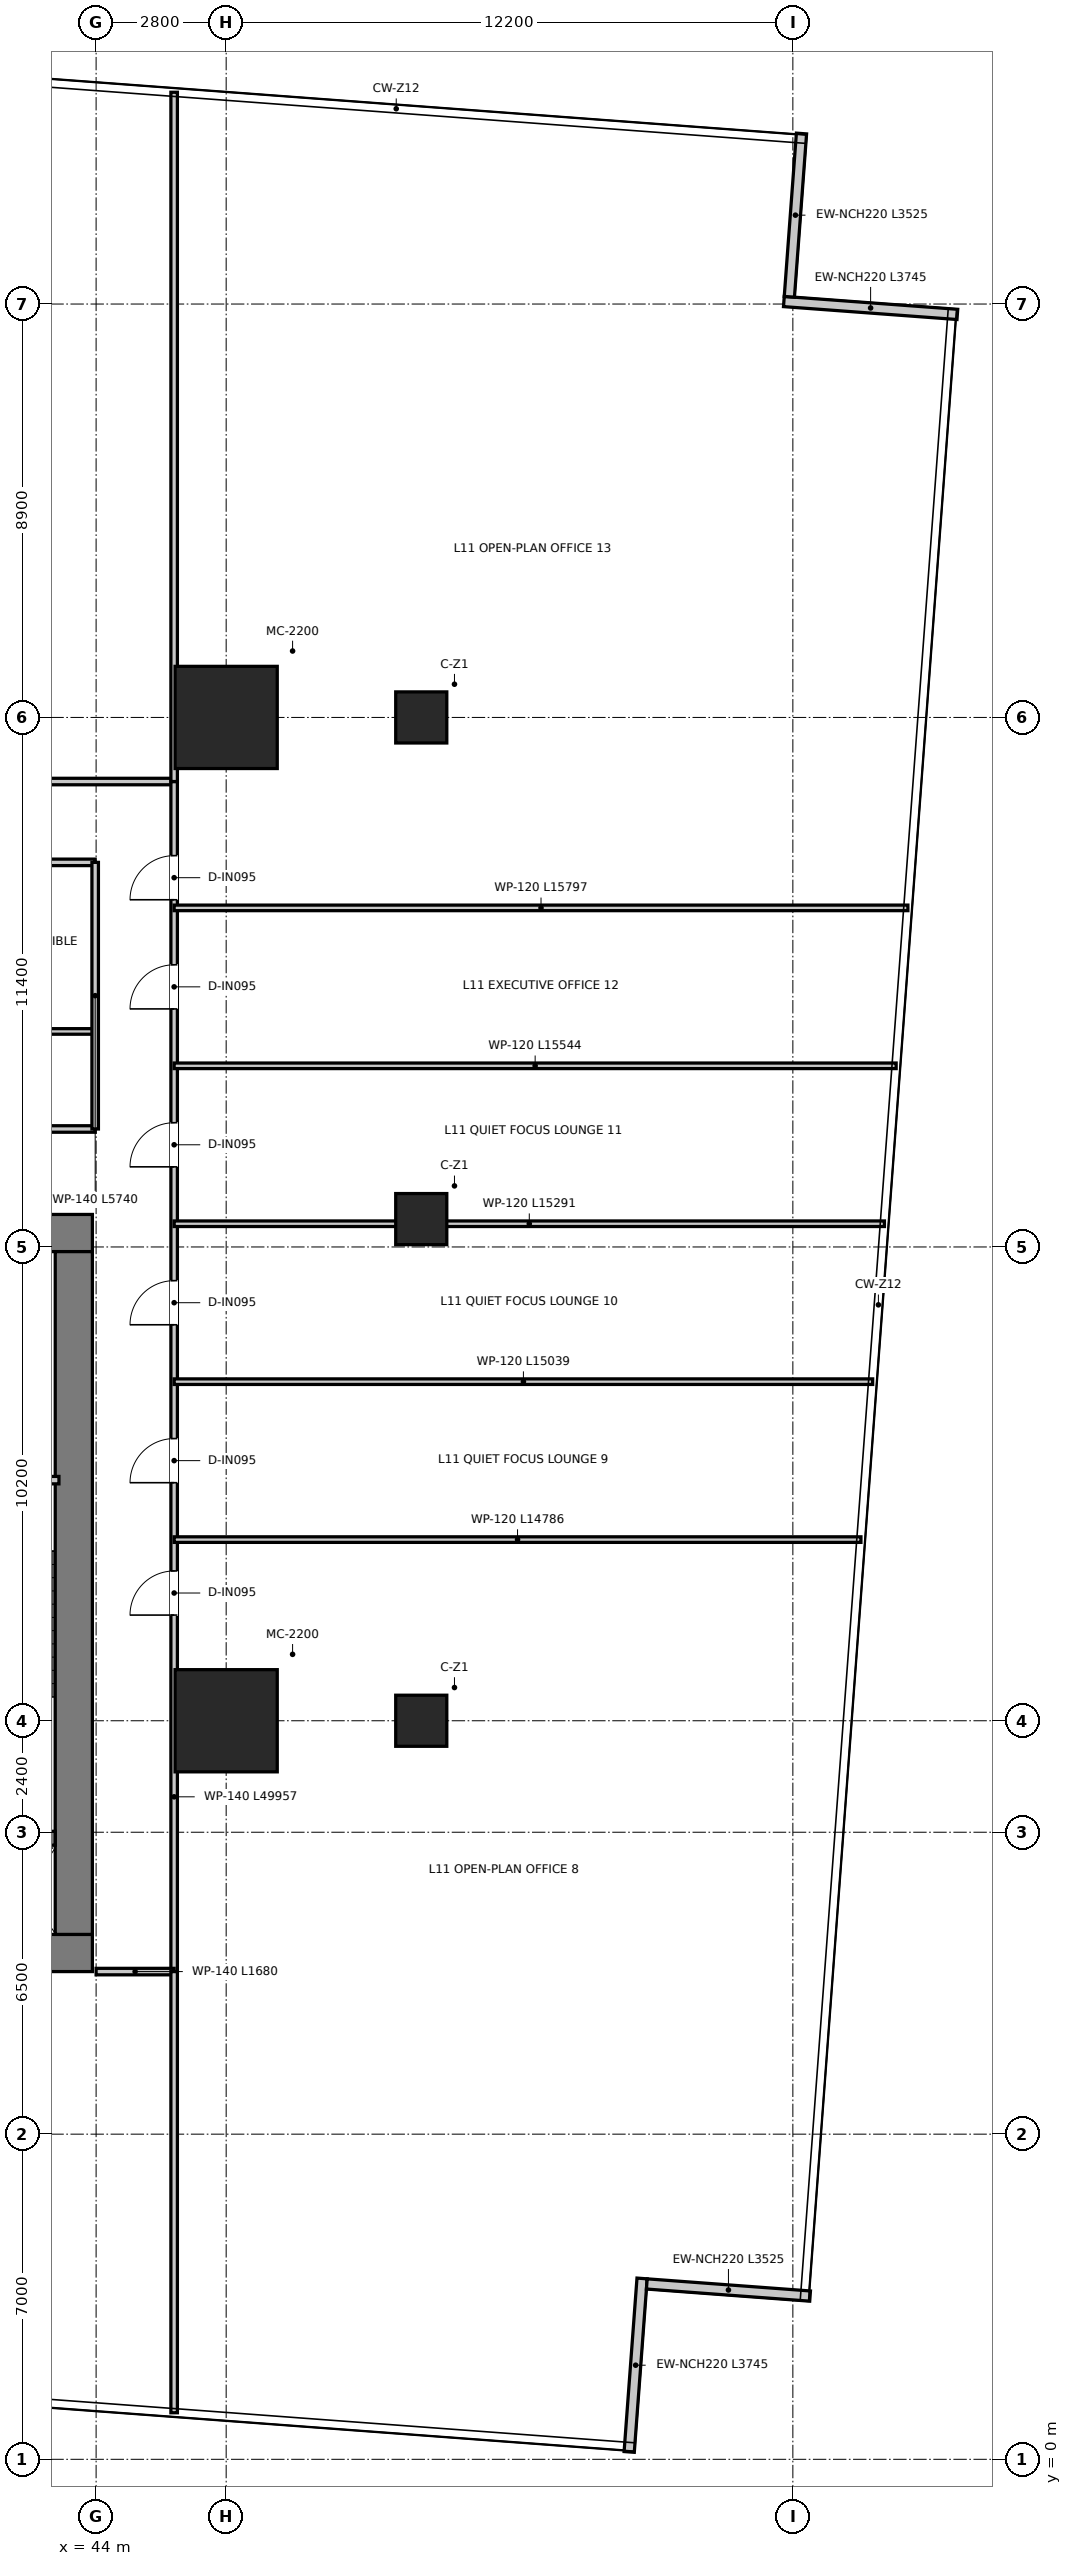
"""IFC4 building model, lengths in metres.
Left out: names, types, materials, properties, quantities, classifications, styles, units other than length and angle.
Written with IfcOpenShell. Run it as: python <this file> out.ifc"""

import sys

from ifc_helpers import new_model, si_unit, direction, frame, frame_2d, origin, origin_2d, place, context, subcontext, project, spatial, rectangle, extrude, source, transform, mapped, element, fill, save


model = new_model("IFC4")
c1 = context("Model", 3, precision=1e-05, world=origin(), true_north=direction((0.0, 1.0)))
c2 = subcontext(c1, "Body", "Model", "MODEL_VIEW")
j1 = project(units=[si_unit("LENGTHUNIT", "METRE"), si_unit("PLANEANGLEUNIT", "RADIAN")], contexts=[c1])
p1 = place(None, origin())
s1 = spatial("IfcSite", under=j1, at=p1, CompositionType="ELEMENT")
p2 = place(p1, origin())
s2 = spatial("IfcBuilding", under=s1, at=p2, CompositionType="ELEMENT")
p3 = place(p2, frame((0.0, 0.0, 48.7)))
s3 = spatial("IfcBuildingStorey", under=s2, at=p3, CompositionType="ELEMENT", Elevation=48.7)
p4 = place(p3, frame((28.08, 10.9, 0.0), z_axis=(0.0, 0.0, 1.0), x_axis=(1.0, 0.0, 0.0)))
e1 = element("IfcWall", 1, at=p4, inside=s3, PredefinedType="SHEAR", context=c2, shape_type="SweptSolid", body=[
    extrude(rectangle(XDim=15.84, YDim=0.8, at=frame_2d((7.92, 0.0))), origin(), (0.0, 0.0, 1.0), 3.95),
])
p5 = place(p3, frame((28.08, 26.4, 0.0), z_axis=(0.0, 0.0, 1.0), x_axis=(1.0, 0.0, 0.0)))
e2 = element("IfcWall", 2, at=p5, inside=s3, PredefinedType="SHEAR", context=c2, shape_type="SweptSolid", body=[
    extrude(rectangle(XDim=15.84, YDim=0.8, at=frame_2d((7.92, 0.0))), origin(), (0.0, 0.0, 1.0), 3.95),
])
p6 = place(p5, frame((7.22, 0.0, 0.0)))
e3 = element("IfcOpeningElement", 3, at=p6, cuts=e2, PredefinedType="OPENING", context=c2, shape_type="SweptSolid", body=[
    extrude(rectangle(XDim=1.4, YDim=2.2, at=frame_2d((0.7, 1.1))), frame((0.0, 0.41, 0.0), z_axis=(0.0, -1.0, 0.0), x_axis=(1.0, 0.0, 0.0)), (0.0, 0.0, 1.0), 0.82),
])
p7 = place(p5, frame((1.775, 0.0, 0.0)))
e4 = element("IfcOpeningElement", 4, at=p7, cuts=e2, PredefinedType="OPENING", context=c2, shape_type="SweptSolid", body=[
    extrude(rectangle(XDim=1.05, YDim=2.1, at=frame_2d((0.525, 1.05))), frame((0.0, 0.41, 0.0), z_axis=(0.0, -1.0, 0.0), x_axis=(1.0, 0.0, 0.0)), (0.0, 0.0, 1.0), 0.82),
])
p8 = place(p5, frame((13.015, 0.0, 0.0)))
e5 = element("IfcOpeningElement", 5, at=p8, cuts=e2, PredefinedType="OPENING", context=c2, shape_type="SweptSolid", body=[
    extrude(rectangle(XDim=1.05, YDim=2.1, at=frame_2d((0.525, 1.05))), frame((0.0, 0.41, 0.0), z_axis=(0.0, -1.0, 0.0), x_axis=(1.0, 0.0, 0.0)), (0.0, 0.0, 1.0), 0.82),
])
p9 = place(p3, frame((43.52, 11.3, 0.0), z_axis=(0.0, 0.0, 1.0), x_axis=(0.0, 1.0, 0.0)))
e6 = element("IfcWall", 6, at=p9, inside=s3, PredefinedType="SHEAR", context=c2, shape_type="SweptSolid", body=[
    extrude(rectangle(XDim=14.7, YDim=0.8, at=frame_2d((7.35, 0.0))), origin(), (0.0, 0.0, 1.0), 3.95),
])
p10 = place(p3, frame((40.02, 13.37, 0.0), z_axis=(0.0, 0.0, 1.0), x_axis=(1.0, 0.0, 0.0)))
e7 = element("IfcWall", 7, at=p10, inside=s3, PredefinedType="SHEAR", context=c2, shape_type="SweptSolid", body=[
    extrude(rectangle(XDim=3.1, YDim=0.3, at=frame_2d((1.55, 0.0))), origin(), (0.0, 0.0, 1.0), 3.95),
])
m1 = source(origin(), c2, "Body", "SweptSolid", [
    extrude(rectangle(XDim=2.2, YDim=2.2, at=origin_2d()), origin(), (0.0, 0.0, 1.0), 3.95),
])
for number, where, z_axis, x_axis in (
    (8, (46.8, 15.9, 0.0), (0.0, 0.0, 1.0), (1.0, 0.0, 0.0)),
    (9, (46.8, 37.5, 0.0), (0.0, 0.0, 1.0), (1.0, 0.0, 0.0)),
):
    element("IfcColumn", number, at=place(p3, frame(where, z_axis=z_axis, x_axis=x_axis)), inside=s3, PredefinedType="USERDEFINED", context=c2, shape_type="MappedRepresentation", body=[
        mapped(m1, transform((0.0, 0.0, 0.0), x_axis=(1.0, 0.0, 0.0), y_axis=(0.0, 1.0, 0.0), z_axis=(0.0, 0.0, 1.0), scale=1.0)),
    ])
m2 = source(origin(), c2, "Body", "SweptSolid", [
    extrude(rectangle(XDim=1.1, YDim=1.1, at=origin_2d()), origin(), (0.0, 0.0, 1.0), 3.95),
])
for number, where, z_axis, x_axis in (
    (10, (51.0, 37.5, 0.0), (0.0, 0.0, 1.0), (1.0, 0.0, 0.0)),
    (11, (51.0, 26.7, 0.0), (0.0, 0.0, 1.0), (1.0, 0.0, 0.0)),
    (12, (51.0, 15.9, 0.0), (0.0, 0.0, 1.0), (1.0, 0.0, 0.0)),
):
    element("IfcColumn", number, at=place(p3, frame(where, z_axis=z_axis, x_axis=x_axis)), inside=s3, PredefinedType="COLUMN", context=c2, shape_type="MappedRepresentation", body=[
        mapped(m2, transform((0.0, 0.0, 0.0), x_axis=(1.0, 0.0, 0.0), y_axis=(0.0, 1.0, 0.0), z_axis=(0.0, 0.0, 1.0), scale=1.0)),
    ])
p11 = place(p3, frame((55.477, 0.159, 0.0), z_axis=(0.0, 0.0, 1.0), x_axis=(0.074123825884, 0.997249045342, 0.0)))
e13 = element("IfcWall", 13, at=p11, inside=s3, PredefinedType="ELEMENTEDWALL", context=c2, shape_type="SweptSolid", body=[
    extrude(rectangle(XDim=3.745, YDim=0.22, at=frame_2d((1.873, 0.0))), origin(), (0.0, 0.0, 1.0), 3.67),
])
p12 = place(p3, frame((55.856, 3.775, 0.0), z_axis=(0.0, 0.0, 1.0), x_axis=(0.997250341397, -0.074106386922, 0.0)))
e14 = element("IfcWall", 14, at=p12, inside=s3, PredefinedType="ELEMENTEDWALL", context=c2, shape_type="SweptSolid", body=[
    extrude(rectangle(XDim=3.525, YDim=0.22, at=frame_2d((1.763, 0.0))), origin(), (0.0, 0.0, 1.0), 3.67),
])
p13 = place(p3, frame((62.541, 46.177, 0.0), z_axis=(0.0, 0.0, 1.0), x_axis=(-0.997249045342, 0.074123825884, 0.0)))
e15 = element("IfcWall", 15, at=p13, inside=s3, PredefinedType="ELEMENTEDWALL", context=c2, shape_type="SweptSolid", body=[
    extrude(rectangle(XDim=3.745, YDim=0.22, at=frame_2d((1.873, 0.0))), origin(), (0.0, 0.0, 1.0), 3.67),
])
p14 = place(p3, frame((58.925, 46.556, 0.0), z_axis=(0.0, 0.0, 1.0), x_axis=(0.074106386922, 0.997250341397, 0.0)))
e16 = element("IfcWall", 16, at=p14, inside=s3, PredefinedType="ELEMENTEDWALL", context=c2, shape_type="SweptSolid", body=[
    extrude(rectangle(XDim=3.525, YDim=0.22, at=frame_2d((1.763, 0.0))), origin(), (0.0, 0.0, 1.0), 3.67),
])
p15 = place(p3, frame((40.04, 21.08, 0.0), z_axis=(0.0, 0.0, 1.0), x_axis=(1.0, 0.0, 0.0)))
e17 = element("IfcWall", 17, at=p15, inside=s3, PredefinedType="PARTITIONING", context=c2, shape_type="SweptSolid", body=[
    extrude(rectangle(XDim=3.16, YDim=0.16, at=frame_2d((1.58, 0.0))), origin(), (0.0, 0.0, 1.0), 3.67),
])
p16 = place(p15, frame((1.055, 0.0, 0.0)))
e18 = element("IfcOpeningElement", 18, at=p16, cuts=e17, PredefinedType="OPENING", context=c2, shape_type="SweptSolid", body=[
    extrude(rectangle(XDim=1.05, YDim=2.1, at=frame_2d((0.525, 1.05))), frame((0.0, 0.09, 0.0), z_axis=(0.0, -1.0, 0.0), x_axis=(1.0, 0.0, 0.0)), (0.0, 0.0, 1.0), 0.18),
])
p17 = place(p3, frame((28.02, 28.64, 0.0), z_axis=(0.0, 0.0, 1.0), x_axis=(1.0, 0.0, 0.0)))
e19 = element("IfcWall", 19, at=p17, inside=s3, PredefinedType="PARTITIONING", context=c2, shape_type="SweptSolid", body=[
    extrude(rectangle(XDim=15.96, YDim=0.14, at=frame_2d((7.98, 0.0))), origin(), (0.0, 0.0, 1.0), 3.08),
])
p18 = place(p17, frame((7.455, 0.0, 0.0)))
e20 = element("IfcOpeningElement", 20, at=p18, cuts=e19, PredefinedType="OPENING", context=c2, shape_type="SweptSolid", body=[
    extrude(rectangle(XDim=1.05, YDim=2.15, at=frame_2d((0.525, 1.075))), frame((0.0, 0.08, 0.0), z_axis=(0.0, -1.0, 0.0), x_axis=(1.0, 0.0, 0.0)), (0.0, 0.0, 1.0), 0.16),
])
p19 = place(p3, frame((28.02, 30.74, 0.0), z_axis=(0.0, 0.0, 1.0), x_axis=(1.0, 0.0, 0.0)))
e21 = element("IfcWall", 21, at=p19, inside=s3, PredefinedType="PARTITIONING", context=c2, shape_type="SweptSolid", body=[
    extrude(rectangle(XDim=15.96, YDim=0.12, at=frame_2d((7.98, 0.0))), origin(), (0.0, 0.0, 1.0), 3.08),
])
p20 = place(p3, frame((28.02, 34.38, 0.0), z_axis=(0.0, 0.0, 1.0), x_axis=(1.0, 0.0, 0.0)))
e22 = element("IfcWall", 22, at=p20, inside=s3, PredefinedType="PARTITIONING", context=c2, shape_type="SweptSolid", body=[
    extrude(rectangle(XDim=15.96, YDim=0.14, at=frame_2d((7.98, 0.0))), origin(), (0.0, 0.0, 1.0), 3.08),
])
p21 = place(p20, frame((7.83, 0.0, 0.0)))
e23 = element("IfcOpeningElement", 23, at=p21, cuts=e22, PredefinedType="OPENING", context=c2, shape_type="SweptSolid", body=[
    extrude(rectangle(XDim=0.9, YDim=2.1, at=frame_2d((0.45, 1.05))), frame((0.0, 0.08, 0.0), z_axis=(0.0, -1.0, 0.0), x_axis=(1.0, 0.0, 0.0)), (0.0, 0.0, 1.0), 0.16),
])
p22 = place(p20, frame((11.03, 0.0, 0.0)))
e24 = element("IfcOpeningElement", 24, at=p22, cuts=e22, PredefinedType="OPENING", context=c2, shape_type="SweptSolid", body=[
    extrude(rectangle(XDim=0.9, YDim=2.1, at=frame_2d((0.45, 1.05))), frame((0.0, 0.08, 0.0), z_axis=(0.0, -1.0, 0.0), x_axis=(1.0, 0.0, 0.0)), (0.0, 0.0, 1.0), 0.16),
])
p23 = place(p20, frame((14.055, 0.0, 0.0)))
e25 = element("IfcOpeningElement", 25, at=p23, cuts=e22, PredefinedType="OPENING", context=c2, shape_type="SweptSolid", body=[
    extrude(rectangle(XDim=0.95, YDim=2.1, at=frame_2d((0.475, 1.05))), frame((0.0, 0.08, 0.0), z_axis=(0.0, -1.0, 0.0), x_axis=(1.0, 0.0, 0.0)), (0.0, 0.0, 1.0), 0.16),
])
p24 = place(p20, frame((2.855, 0.0, 0.0)))
e26 = element("IfcOpeningElement", 26, at=p24, cuts=e22, PredefinedType="OPENING", context=c2, shape_type="SweptSolid", body=[
    extrude(rectangle(XDim=0.95, YDim=2.1, at=frame_2d((0.475, 1.05))), frame((0.0, 0.08, 0.0), z_axis=(0.0, -1.0, 0.0), x_axis=(1.0, 0.0, 0.0)), (0.0, 0.0, 1.0), 0.16),
])
p25 = place(p3, frame((43.98, 28.64, 0.0), z_axis=(0.0, 0.0, 1.0), x_axis=(0.0, 1.0, 0.0)))
e27 = element("IfcWall", 27, at=p25, inside=s3, PredefinedType="PARTITIONING", context=c2, shape_type="SweptSolid", body=[
    extrude(rectangle(XDim=5.74, YDim=0.14, at=frame_2d((2.87, 0.0))), origin(), (0.0, 0.0, 1.0), 3.22),
])
p26 = place(p3, frame((26.32, 36.12, 0.0), z_axis=(0.0, 0.0, 1.0), x_axis=(1.0, 0.0, 0.0)))
e28 = element("IfcWall", 28, at=p26, inside=s3, PredefinedType="PARTITIONING", context=c2, shape_type="SweptSolid", body=[
    extrude(rectangle(XDim=19.36, YDim=0.14, at=frame_2d((9.68, 0.0))), origin(), (0.0, 0.0, 1.0), 3.08),
])
p27 = place(p26, frame((9.205, 0.0, 0.0)))
e29 = element("IfcOpeningElement", 29, at=p27, cuts=e28, PredefinedType="OPENING", context=c2, shape_type="SweptSolid", body=[
    extrude(rectangle(XDim=0.95, YDim=2.1, at=frame_2d((0.475, 1.05))), frame((0.0, 0.08, 0.0), z_axis=(0.0, -1.0, 0.0), x_axis=(1.0, 0.0, 0.0)), (0.0, 0.0, 1.0), 0.16),
])
p28 = place(p3, frame((45.68, 10.5, 0.0), z_axis=(0.0, 0.0, 1.0), x_axis=(0.0, 1.0, 0.0)))
e30 = element("IfcWall", 30, at=p28, inside=s3, PredefinedType="PARTITIONING", context=c2, shape_type="SweptSolid", body=[
    extrude(rectangle(XDim=25.62, YDim=0.14, at=frame_2d((12.81, 0.0))), origin(), (0.0, 0.0, 1.0), 2.97),
])
p29 = place(p28, frame((7.675, 0.0, 0.0)))
e31 = element("IfcOpeningElement", 31, at=p29, cuts=e30, PredefinedType="OPENING", context=c2, shape_type="SweptSolid", body=[
    extrude(rectangle(XDim=0.95, YDim=2.1, at=frame_2d((0.475, 1.05))), frame((0.0, 0.08, 0.0), z_axis=(0.0, -1.0, 0.0), x_axis=(1.0, 0.0, 0.0)), (0.0, 0.0, 1.0), 0.16),
])
p30 = place(p28, frame((10.525, 0.0, 0.0)))
e32 = element("IfcOpeningElement", 32, at=p30, cuts=e30, PredefinedType="OPENING", context=c2, shape_type="SweptSolid", body=[
    extrude(rectangle(XDim=0.95, YDim=2.1, at=frame_2d((0.475, 1.05))), frame((0.0, 0.08, 0.0), z_axis=(0.0, -1.0, 0.0), x_axis=(1.0, 0.0, 0.0)), (0.0, 0.0, 1.0), 0.16),
])
p31 = place(p28, frame((13.925, 0.0, 0.0)))
e33 = element("IfcOpeningElement", 33, at=p31, cuts=e30, PredefinedType="OPENING", context=c2, shape_type="SweptSolid", body=[
    extrude(rectangle(XDim=0.95, YDim=2.1, at=frame_2d((0.475, 1.05))), frame((0.0, 0.08, 0.0), z_axis=(0.0, -1.0, 0.0), x_axis=(1.0, 0.0, 0.0)), (0.0, 0.0, 1.0), 0.16),
])
p32 = place(p28, frame((17.325, 0.0, 0.0)))
e34 = element("IfcOpeningElement", 34, at=p32, cuts=e30, PredefinedType="OPENING", context=c2, shape_type="SweptSolid", body=[
    extrude(rectangle(XDim=0.95, YDim=2.1, at=frame_2d((0.475, 1.05))), frame((0.0, 0.08, 0.0), z_axis=(0.0, -1.0, 0.0), x_axis=(1.0, 0.0, 0.0)), (0.0, 0.0, 1.0), 0.16),
])
p33 = place(p28, frame((20.725, 0.0, 0.0)))
e35 = element("IfcOpeningElement", 35, at=p33, cuts=e30, PredefinedType="OPENING", context=c2, shape_type="SweptSolid", body=[
    extrude(rectangle(XDim=0.95, YDim=2.1, at=frame_2d((0.475, 1.05))), frame((0.0, 0.08, 0.0), z_axis=(0.0, -1.0, 0.0), x_axis=(1.0, 0.0, 0.0)), (0.0, 0.0, 1.0), 0.16),
])
p34 = place(p28, frame((23.075, 0.0, 0.0)))
e36 = element("IfcOpeningElement", 36, at=p34, cuts=e30, PredefinedType="OPENING", context=c2, shape_type="SweptSolid", body=[
    extrude(rectangle(XDim=0.95, YDim=2.1, at=frame_2d((0.475, 1.05))), frame((0.0, 0.08, 0.0), z_axis=(0.0, -1.0, 0.0), x_axis=(1.0, 0.0, 0.0)), (0.0, 0.0, 1.0), 0.16),
])
p35 = place(p3, frame((44.0, 10.5, 0.0), z_axis=(0.0, 0.0, 1.0), x_axis=(1.0, 0.0, 0.0)))
e37 = element("IfcWall", 37, at=p35, inside=s3, PredefinedType="PARTITIONING", context=c2, shape_type="SweptSolid", body=[
    extrude(rectangle(XDim=1.68, YDim=0.14, at=frame_2d((0.84, 0.0))), origin(), (0.0, 0.0, 1.0), 3.67),
])
p36 = place(p3, frame((45.68, 36.12, 0.0), z_axis=(0.0, 0.0, 1.0), x_axis=(0.0, 1.0, 0.0)))
e38 = element("IfcWall", 38, at=p36, inside=s3, PredefinedType="PARTITIONING", context=c2, shape_type="SweptSolid", body=[
    extrude(rectangle(XDim=14.839, YDim=0.14, at=frame_2d((7.419, 0.0))), origin(), (0.0, 0.0, 1.0), 2.97),
])
p37 = place(p3, frame((45.68, 1.002, 0.0), z_axis=(0.0, 0.0, 1.0), x_axis=(0.0, 1.0, 0.0)))
e39 = element("IfcWall", 39, at=p37, inside=s3, PredefinedType="PARTITIONING", context=c2, shape_type="SweptSolid", body=[
    extrude(rectangle(XDim=9.498, YDim=0.14, at=frame_2d((4.749, 0.0))), origin(), (0.0, 0.0, 1.0), 3.67),
])
p38 = place(p3, frame((45.68, 19.8, 0.0), z_axis=(0.0, 0.0, 1.0), x_axis=(1.0, 0.0, 0.0)))
e40 = element("IfcWall", 40, at=p38, inside=s3, PredefinedType="PARTITIONING", context=c2, shape_type="SweptSolid", body=[
    extrude(rectangle(XDim=14.786, YDim=0.12, at=frame_2d((7.393, 0.0))), origin(), (0.0, 0.0, 1.0), 2.97),
])
p39 = place(p3, frame((45.68, 23.2, 0.0), z_axis=(0.0, 0.0, 1.0), x_axis=(1.0, 0.0, 0.0)))
e41 = element("IfcWall", 41, at=p39, inside=s3, PredefinedType="PARTITIONING", context=c2, shape_type="SweptSolid", body=[
    extrude(rectangle(XDim=15.039, YDim=0.12, at=frame_2d((7.519, 0.0))), origin(), (0.0, 0.0, 1.0), 2.97),
])
p40 = place(p3, frame((45.68, 26.6, 0.0), z_axis=(0.0, 0.0, 1.0), x_axis=(1.0, 0.0, 0.0)))
e42 = element("IfcWall", 42, at=p40, inside=s3, PredefinedType="PARTITIONING", context=c2, shape_type="SweptSolid", body=[
    extrude(rectangle(XDim=15.291, YDim=0.12, at=frame_2d((7.646, 0.0))), origin(), (0.0, 0.0, 1.0), 2.97),
])
p41 = place(p3, frame((45.68, 30.0, 0.0), z_axis=(0.0, 0.0, 1.0), x_axis=(1.0, 0.0, 0.0)))
e43 = element("IfcWall", 43, at=p41, inside=s3, PredefinedType="PARTITIONING", context=c2, shape_type="SweptSolid", body=[
    extrude(rectangle(XDim=15.544, YDim=0.12, at=frame_2d((7.772, 0.0))), origin(), (0.0, 0.0, 1.0), 2.97),
])
p42 = place(p3, frame((45.68, 33.4, 0.0), z_axis=(0.0, 0.0, 1.0), x_axis=(1.0, 0.0, 0.0)))
e44 = element("IfcWall", 44, at=p42, inside=s3, PredefinedType="PARTITIONING", context=c2, shape_type="SweptSolid", body=[
    extrude(rectangle(XDim=15.797, YDim=0.12, at=frame_2d((7.898, 0.0))), origin(), (0.0, 0.0, 1.0), 2.97),
])
p43 = place(p29, origin())
e45 = element("IfcDoor", 45, at=p43, inside=s3, OperationType="SINGLE_SWING_LEFT", PredefinedType="DOOR", context=c2, shape_type="SweptSolid", body=[
    extrude(rectangle(XDim=0.95, YDim=2.1, at=frame_2d((0.475, 1.05))), frame((0.0, 0.025, 0.0), z_axis=(0.0, -1.0, 0.0), x_axis=(1.0, 0.0, 0.0)), (0.0, 0.0, 1.0), 0.05),
])
fill(e31, e45)
p44 = place(p30, origin())
e46 = element("IfcDoor", 46, at=p44, inside=s3, OperationType="SINGLE_SWING_LEFT", PredefinedType="DOOR", context=c2, shape_type="SweptSolid", body=[
    extrude(rectangle(XDim=0.95, YDim=2.1, at=frame_2d((0.475, 1.05))), frame((0.0, 0.025, 0.0), z_axis=(0.0, -1.0, 0.0), x_axis=(1.0, 0.0, 0.0)), (0.0, 0.0, 1.0), 0.05),
])
fill(e32, e46)
p45 = place(p31, origin())
e47 = element("IfcDoor", 47, at=p45, inside=s3, OperationType="SINGLE_SWING_LEFT", PredefinedType="DOOR", context=c2, shape_type="SweptSolid", body=[
    extrude(rectangle(XDim=0.95, YDim=2.1, at=frame_2d((0.475, 1.05))), frame((0.0, 0.025, 0.0), z_axis=(0.0, -1.0, 0.0), x_axis=(1.0, 0.0, 0.0)), (0.0, 0.0, 1.0), 0.05),
])
fill(e33, e47)
p46 = place(p32, origin())
e48 = element("IfcDoor", 48, at=p46, inside=s3, OperationType="SINGLE_SWING_LEFT", PredefinedType="DOOR", context=c2, shape_type="SweptSolid", body=[
    extrude(rectangle(XDim=0.95, YDim=2.1, at=frame_2d((0.475, 1.05))), frame((0.0, 0.025, 0.0), z_axis=(0.0, -1.0, 0.0), x_axis=(1.0, 0.0, 0.0)), (0.0, 0.0, 1.0), 0.05),
])
fill(e34, e48)
p47 = place(p33, origin())
e49 = element("IfcDoor", 49, at=p47, inside=s3, OperationType="SINGLE_SWING_LEFT", PredefinedType="DOOR", context=c2, shape_type="SweptSolid", body=[
    extrude(rectangle(XDim=0.95, YDim=2.1, at=frame_2d((0.475, 1.05))), frame((0.0, 0.025, 0.0), z_axis=(0.0, -1.0, 0.0), x_axis=(1.0, 0.0, 0.0)), (0.0, 0.0, 1.0), 0.05),
])
fill(e35, e49)
p48 = place(p34, origin())
e50 = element("IfcDoor", 50, at=p48, inside=s3, OperationType="SINGLE_SWING_LEFT", PredefinedType="DOOR", context=c2, shape_type="SweptSolid", body=[
    extrude(rectangle(XDim=0.95, YDim=2.1, at=frame_2d((0.475, 1.05))), frame((0.0, 0.025, 0.0), z_axis=(0.0, -1.0, 0.0), x_axis=(1.0, 0.0, 0.0)), (0.0, 0.0, 1.0), 0.05),
])
fill(e36, e50)
save(model, sys.argv[1])
